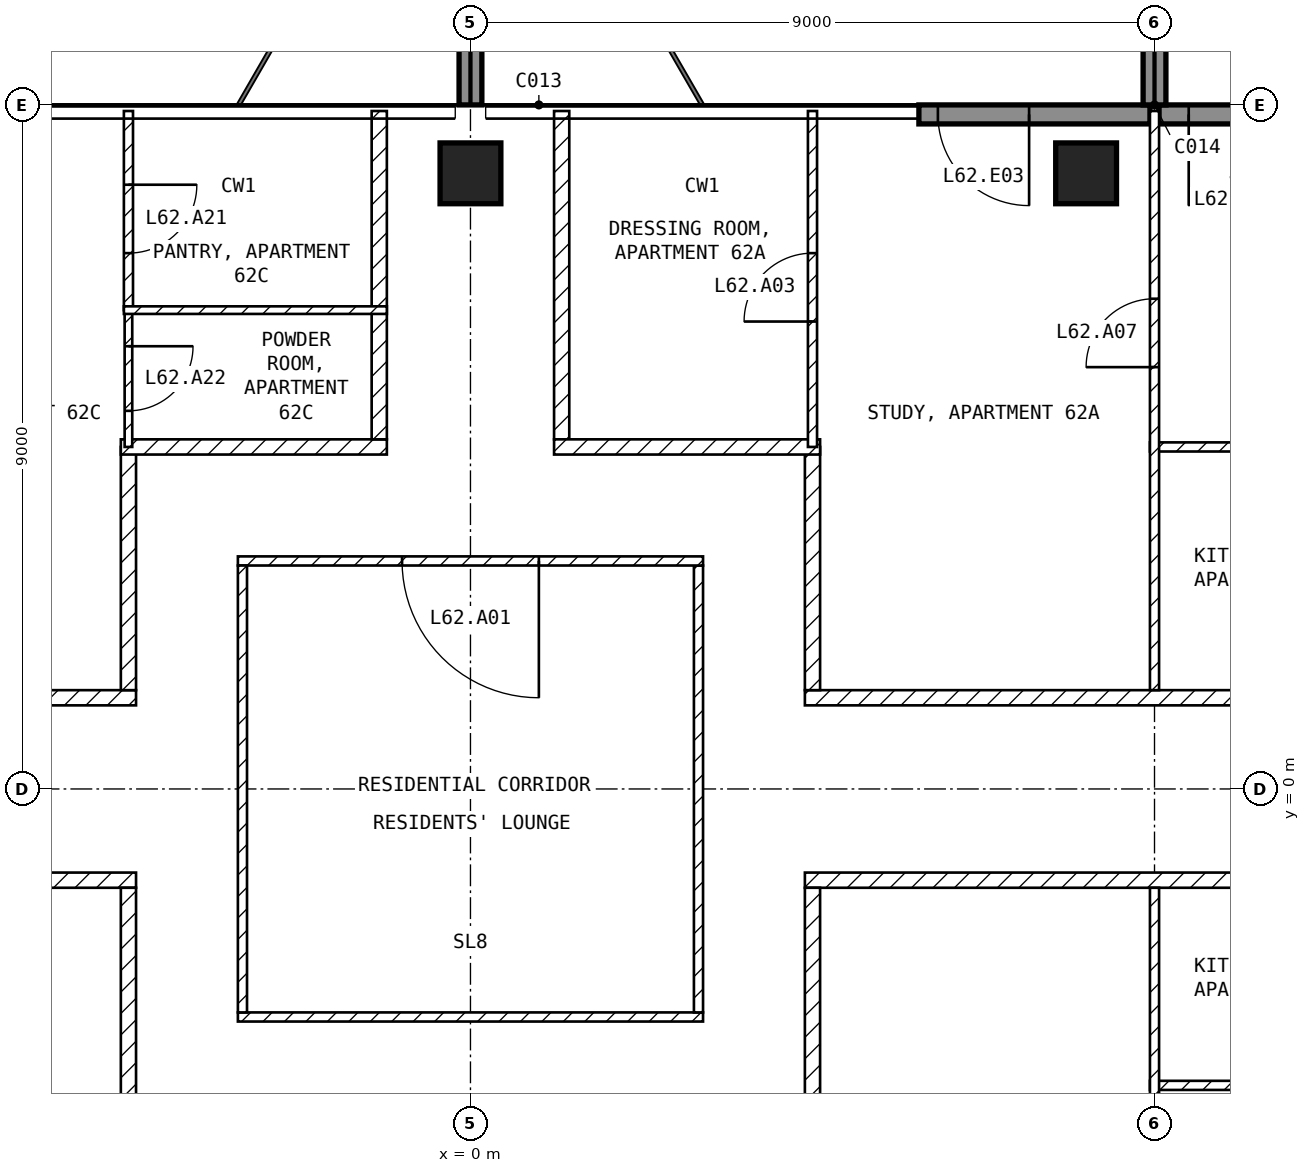
"""IFC4 building model, lengths in metres.
Left out: names, types, materials, properties, quantities, classifications, styles, units other than length and angle.
Written with IfcOpenShell. Run it as: python <this file> out.ifc"""

import sys

from ifc_helpers import new_model, si_unit, direction, frame, frame_2d, origin, origin_2d, place, context, subcontext, project, spatial, rectangle, extrude, element, fill, save


model = new_model("IFC4")
c1 = context("Model", 3, precision=1e-05, world=origin(), true_north=direction((0.0, 1.0)))
c2 = subcontext(c1, "Body", "Model", "MODEL_VIEW")
j1 = project(units=[si_unit("LENGTHUNIT", "METRE"), si_unit("PLANEANGLEUNIT", "RADIAN")], contexts=[c1])
p1 = place(None, origin())
s1 = spatial("IfcSite", under=j1, at=p1, CompositionType="ELEMENT")
p2 = place(p1, origin())
s2 = spatial("IfcBuilding", under=s1, at=p2, CompositionType="ELEMENT")
p3 = place(p2, frame((0.0, 0.0, 246.5)))
s3 = spatial("IfcBuildingStorey", under=s2, at=p3, CompositionType="ELEMENT", Elevation=246.5)
for number, where, z_axis, x_axis in (
    (1, (0.0, 8.1, -0.25), (0.0, 0.0, 1.0), (1.0, 0.0, 0.0)),
    (2, (8.1, 8.1, -0.25), (0.0, 0.0, 1.0), (1.0, 0.0, 0.0)),
):
    element("IfcColumn", number, at=place(p3, frame(where, z_axis=z_axis, x_axis=x_axis)), inside=s3, PredefinedType="COLUMN", context=c2, shape_type="SweptSolid", body=[
        extrude(rectangle(XDim=0.8, YDim=0.8, at=origin_2d()), origin(), (0.0, 0.0, 1.0), 3.5),
    ])
p4 = place(p3, frame((10.9, 8.875, 0.0), z_axis=(0.0, 0.0, 1.0), x_axis=(-1.0, 0.0, 0.0)))
e3 = element("IfcWall", 3, at=p4, inside=s3, PredefinedType="SOLIDWALL", context=c2, shape_type="SweptSolid", body=[
    extrude(rectangle(XDim=1.84, YDim=0.25, at=frame_2d((0.92, 0.0))), origin(), (0.0, 0.0, 1.0), 3.25),
])
p5 = place(p4, frame((0.25, 0.0, 0.0)))
e4 = element("IfcOpeningElement", 4, at=p5, cuts=e3, PredefinedType="OPENING", context=c2, shape_type="SweptSolid", body=[
    extrude(rectangle(XDim=1.2, YDim=2.4, at=frame_2d((0.6, 1.2))), frame((0.0, 0.135, 0.0), z_axis=(0.0, -1.0, 0.0), x_axis=(1.0, 0.0, 0.0)), (0.0, 0.0, 1.0), 0.27),
])
p6 = place(p3, frame((8.94, 8.875, 0.0), z_axis=(0.0, 0.0, 1.0), x_axis=(-1.0, 0.0, 0.0)))
e5 = element("IfcWall", 5, at=p6, inside=s3, PredefinedType="SOLIDWALL", context=c2, shape_type="SweptSolid", body=[
    extrude(rectangle(XDim=3.04, YDim=0.25, at=frame_2d((1.52, 0.0))), origin(), (0.0, 0.0, 1.0), 3.25),
])
p7 = place(p6, frame((1.59, 0.0, 0.0)))
e6 = element("IfcOpeningElement", 6, at=p7, cuts=e5, PredefinedType="OPENING", context=c2, shape_type="SweptSolid", body=[
    extrude(rectangle(XDim=1.2, YDim=2.4, at=frame_2d((0.6, 1.2))), frame((0.0, 0.135, 0.0), z_axis=(0.0, -1.0, 0.0), x_axis=(1.0, 0.0, 0.0)), (0.0, 0.0, 1.0), 0.27),
])
for number, where, z_axis, x_axis in (
    (7, (0.0, 9.0, 0.0), (0.0, 0.0, 1.0), (0.0, 1.0, 0.0)),
    (8, (9.0, 9.0, 0.0), (0.0, 0.0, 1.0), (0.0, 1.0, 0.0)),
):
    element("IfcWall", number, at=place(p3, frame(where, z_axis=z_axis, x_axis=x_axis)), inside=s3, PredefinedType="SOLIDWALL", context=c2, shape_type="SweptSolid", body=[
        extrude(rectangle(XDim=2.7, YDim=0.3, at=frame_2d((1.35, 0.0))), origin(), (0.0, 0.0, 1.0), 3.25),
    ])
p8 = place(p3, frame((-3.06, -3.0, 0.0), z_axis=(0.0, 0.0, 1.0), x_axis=(1.0, 0.0, 0.0)))
e9 = element("IfcWall", 9, at=p8, inside=s3, PredefinedType="PARTITIONING", context=c2, shape_type="SweptSolid", body=[
    extrude(rectangle(XDim=6.12, YDim=0.12, at=frame_2d((3.06, 0.0))), origin(), (0.0, 0.0, 1.0), 3.25),
])
p9 = place(p3, frame((3.0, -2.94, 0.0), z_axis=(0.0, 0.0, 1.0), x_axis=(0.0, 1.0, 0.0)))
e10 = element("IfcWall", 10, at=p9, inside=s3, PredefinedType="PARTITIONING", context=c2, shape_type="SweptSolid", body=[
    extrude(rectangle(XDim=5.88, YDim=0.12, at=frame_2d((2.94, 0.0))), origin(), (0.0, 0.0, 1.0), 3.25),
])
p10 = place(p3, frame((3.06, 3.0, 0.0), z_axis=(0.0, 0.0, 1.0), x_axis=(-1.0, 0.0, 0.0)))
e11 = element("IfcWall", 11, at=p10, inside=s3, PredefinedType="PARTITIONING", context=c2, shape_type="SweptSolid", body=[
    extrude(rectangle(XDim=6.12, YDim=0.12, at=frame_2d((3.06, 0.0))), origin(), (0.0, 0.0, 1.0), 3.25),
])
p11 = place(p10, frame((2.16, 0.0, 0.0)))
e12 = element("IfcOpeningElement", 12, at=p11, cuts=e11, PredefinedType="OPENING", context=c2, shape_type="SweptSolid", body=[
    extrude(rectangle(XDim=1.8, YDim=2.1, at=frame_2d((0.9, 1.05))), frame((0.0, 0.07, 0.0), z_axis=(0.0, -1.0, 0.0), x_axis=(1.0, 0.0, 0.0)), (0.0, 0.0, 1.0), 0.14),
])
p12 = place(p3, frame((-3.0, 2.94, 0.0), z_axis=(0.0, 0.0, 1.0), x_axis=(0.0, -1.0, 0.0)))
e13 = element("IfcWall", 13, at=p12, inside=s3, PredefinedType="PARTITIONING", context=c2, shape_type="SweptSolid", body=[
    extrude(rectangle(XDim=5.88, YDim=0.12, at=frame_2d((2.94, 0.0))), origin(), (0.0, 0.0, 1.0), 3.25),
])
p13 = place(p3, frame((4.4, 1.2, 0.0), z_axis=(0.0, 0.0, 1.0), x_axis=(1.0, 0.0, 0.0)))
e14 = element("IfcWall", 14, at=p13, inside=s3, PredefinedType="PARTITIONING", context=c2, shape_type="SweptSolid", body=[
    extrude(rectangle(XDim=17.2, YDim=0.2, at=frame_2d((8.6, 0.0))), origin(), (0.0, 0.0, 1.0), 3.25),
])
p14 = place(p13, frame((8.3, 0.0, 0.0)))
e15 = element("IfcOpeningElement", 15, at=p14, cuts=e14, PredefinedType="OPENING", context=c2, shape_type="SweptSolid", body=[
    extrude(rectangle(XDim=1.0, YDim=2.1, at=frame_2d((0.5, 1.05))), frame((0.0, 0.11, 0.0), z_axis=(0.0, -1.0, 0.0), x_axis=(1.0, 0.0, 0.0)), (0.0, 0.0, 1.0), 0.22),
])
p15 = place(p3, frame((4.5, 4.5, 0.0), z_axis=(0.0, 0.0, 1.0), x_axis=(0.0, -1.0, 0.0)))
e16 = element("IfcWall", 16, at=p15, inside=s3, PredefinedType="PARTITIONING", context=c2, shape_type="SweptSolid", body=[
    extrude(rectangle(XDim=3.2, YDim=0.2, at=frame_2d((1.6, 0.0))), origin(), (0.0, 0.0, 1.0), 3.25),
])
p16 = place(p3, frame((1.2, 8.92, 0.0), z_axis=(0.0, 0.0, 1.0), x_axis=(0.0, -1.0, 0.0)))
e17 = element("IfcWall", 17, at=p16, inside=s3, PredefinedType="PARTITIONING", context=c2, shape_type="SweptSolid", body=[
    extrude(rectangle(XDim=4.32, YDim=0.2, at=frame_2d((2.16, 0.0))), origin(), (0.0, 0.0, 1.0), 3.25),
])
p17 = place(p3, frame((1.1, 4.5, 0.0), z_axis=(0.0, 0.0, 1.0), x_axis=(1.0, 0.0, 0.0)))
e18 = element("IfcWall", 18, at=p17, inside=s3, PredefinedType="PARTITIONING", context=c2, shape_type="SweptSolid", body=[
    extrude(rectangle(XDim=3.5, YDim=0.2, at=frame_2d((1.75, 0.0))), origin(), (0.0, 0.0, 1.0), 3.25),
])
p18 = place(p3, frame((21.6, -1.2, 0.0), z_axis=(0.0, 0.0, 1.0), x_axis=(-1.0, 0.0, 0.0)))
e19 = element("IfcWall", 19, at=p18, inside=s3, PredefinedType="PARTITIONING", context=c2, shape_type="SweptSolid", body=[
    extrude(rectangle(XDim=17.2, YDim=0.2, at=frame_2d((8.6, 0.0))), origin(), (0.0, 0.0, 1.0), 3.25),
])
p19 = place(p18, frame((7.9, 0.0, 0.0)))
e20 = element("IfcOpeningElement", 20, at=p19, cuts=e19, PredefinedType="OPENING", context=c2, shape_type="SweptSolid", body=[
    extrude(rectangle(XDim=1.0, YDim=2.1, at=frame_2d((0.5, 1.05))), frame((0.0, 0.11, 0.0), z_axis=(0.0, -1.0, 0.0), x_axis=(1.0, 0.0, 0.0)), (0.0, 0.0, 1.0), 0.22),
])
p20 = place(p3, frame((4.5, -1.3, 0.0), z_axis=(0.0, 0.0, 1.0), x_axis=(0.0, -1.0, 0.0)))
e21 = element("IfcWall", 21, at=p20, inside=s3, PredefinedType="PARTITIONING", context=c2, shape_type="SweptSolid", body=[
    extrude(rectangle(XDim=3.2, YDim=0.2, at=frame_2d((1.6, 0.0))), origin(), (0.0, 0.0, 1.0), 3.25),
])
p21 = place(p3, frame((-21.6, 1.2, 0.0), z_axis=(0.0, 0.0, 1.0), x_axis=(1.0, 0.0, 0.0)))
e22 = element("IfcWall", 22, at=p21, inside=s3, PredefinedType="PARTITIONING", context=c2, shape_type="SweptSolid", body=[
    extrude(rectangle(XDim=17.2, YDim=0.2, at=frame_2d((8.6, 0.0))), origin(), (0.0, 0.0, 1.0), 3.25),
])
p22 = place(p21, frame((10.3, 0.0, 0.0)))
e23 = element("IfcOpeningElement", 23, at=p22, cuts=e22, PredefinedType="OPENING", context=c2, shape_type="SweptSolid", body=[
    extrude(rectangle(XDim=1.0, YDim=2.1, at=frame_2d((0.5, 1.05))), frame((0.0, 0.11, 0.0), z_axis=(0.0, -1.0, 0.0), x_axis=(1.0, 0.0, 0.0)), (0.0, 0.0, 1.0), 0.22),
])
p23 = place(p3, frame((-4.5, 1.3, 0.0), z_axis=(0.0, 0.0, 1.0), x_axis=(0.0, 1.0, 0.0)))
e24 = element("IfcWall", 24, at=p23, inside=s3, PredefinedType="PARTITIONING", context=c2, shape_type="SweptSolid", body=[
    extrude(rectangle(XDim=3.2, YDim=0.2, at=frame_2d((1.6, 0.0))), origin(), (0.0, 0.0, 1.0), 3.25),
])
p24 = place(p3, frame((-4.6, 4.5, 0.0), z_axis=(0.0, 0.0, 1.0), x_axis=(1.0, 0.0, 0.0)))
e25 = element("IfcWall", 25, at=p24, inside=s3, PredefinedType="PARTITIONING", context=c2, shape_type="SweptSolid", body=[
    extrude(rectangle(XDim=3.5, YDim=0.2, at=frame_2d((1.75, 0.0))), origin(), (0.0, 0.0, 1.0), 3.25),
])
p25 = place(p3, frame((-1.2, 4.6, 0.0), z_axis=(0.0, 0.0, 1.0), x_axis=(0.0, 1.0, 0.0)))
e26 = element("IfcWall", 26, at=p25, inside=s3, PredefinedType="PARTITIONING", context=c2, shape_type="SweptSolid", body=[
    extrude(rectangle(XDim=4.32, YDim=0.2, at=frame_2d((2.16, 0.0))), origin(), (0.0, 0.0, 1.0), 3.25),
])
p26 = place(p3, frame((-4.4, -1.2, 0.0), z_axis=(0.0, 0.0, 1.0), x_axis=(-1.0, 0.0, 0.0)))
e27 = element("IfcWall", 27, at=p26, inside=s3, PredefinedType="PARTITIONING", context=c2, shape_type="SweptSolid", body=[
    extrude(rectangle(XDim=17.2, YDim=0.2, at=frame_2d((8.6, 0.0))), origin(), (0.0, 0.0, 1.0), 3.25),
])
p27 = place(p26, frame((5.375, 0.0, 0.0)))
e28 = element("IfcOpeningElement", 28, at=p27, cuts=e27, PredefinedType="OPENING", context=c2, shape_type="SweptSolid", body=[
    extrude(rectangle(XDim=1.0, YDim=2.1, at=frame_2d((0.5, 1.05))), frame((0.0, 0.11, 0.0), z_axis=(0.0, -1.0, 0.0), x_axis=(1.0, 0.0, 0.0)), (0.0, 0.0, 1.0), 0.22),
])
p28 = place(p3, frame((-4.5, -4.5, 0.0), z_axis=(0.0, 0.0, 1.0), x_axis=(0.0, 1.0, 0.0)))
e29 = element("IfcWall", 29, at=p28, inside=s3, PredefinedType="PARTITIONING", context=c2, shape_type="SweptSolid", body=[
    extrude(rectangle(XDim=3.2, YDim=0.2, at=frame_2d((1.6, 0.0))), origin(), (0.0, 0.0, 1.0), 3.25),
])
p29 = place(p3, frame((8.94, 4.5, 0.0), z_axis=(0.0, 0.0, 1.0), x_axis=(1.0, 0.0, 0.0)))
e30 = element("IfcWall", 30, at=p29, inside=s3, PredefinedType="PARTITIONING", context=c2, shape_type="SweptSolid", body=[
    extrude(rectangle(XDim=7.86, YDim=0.12, at=frame_2d((3.93, 0.0))), origin(), (0.0, 0.0, 1.0), 3.25),
])
p30 = place(p29, frame((3.81, 0.0, 0.0)))
e31 = element("IfcOpeningElement", 31, at=p30, cuts=e30, PredefinedType="OPENING", context=c2, shape_type="SweptSolid", body=[
    extrude(rectangle(XDim=0.9, YDim=2.1, at=frame_2d((0.45, 1.05))), frame((0.0, 0.07, 0.0), z_axis=(0.0, -1.0, 0.0), x_axis=(1.0, 0.0, 0.0)), (0.0, 0.0, 1.0), 0.14),
])
p31 = place(p3, frame((9.0, 1.3, 0.0), z_axis=(0.0, 0.0, 1.0), x_axis=(0.0, 1.0, 0.0)))
e32 = element("IfcWall", 32, at=p31, inside=s3, PredefinedType="PARTITIONING", context=c2, shape_type="SweptSolid", body=[
    extrude(rectangle(XDim=7.62, YDim=0.12, at=frame_2d((3.81, 0.0))), origin(), (0.0, 0.0, 1.0), 3.25),
])
p32 = place(p31, frame((4.25, 0.0, 0.0)))
e33 = element("IfcOpeningElement", 33, at=p32, cuts=e32, PredefinedType="OPENING", context=c2, shape_type="SweptSolid", body=[
    extrude(rectangle(XDim=0.9, YDim=2.1, at=frame_2d((0.45, 1.05))), frame((0.0, 0.07, 0.0), z_axis=(0.0, -1.0, 0.0), x_axis=(1.0, 0.0, 0.0)), (0.0, 0.0, 1.0), 0.14),
])
p33 = place(p3, frame((4.5, 4.5, 0.0), z_axis=(0.0, 0.0, 1.0), x_axis=(0.0, 1.0, 0.0)))
e34 = element("IfcWall", 34, at=p33, inside=s3, PredefinedType="PARTITIONING", context=c2, shape_type="SweptSolid", body=[
    extrude(rectangle(XDim=4.42, YDim=0.12, at=frame_2d((2.21, 0.0))), origin(), (0.0, 0.0, 1.0), 3.25),
])
p34 = place(p33, frame((1.65, 0.0, 0.0)))
e35 = element("IfcOpeningElement", 35, at=p34, cuts=e34, PredefinedType="OPENING", context=c2, shape_type="SweptSolid", body=[
    extrude(rectangle(XDim=0.9, YDim=2.1, at=frame_2d((0.45, 1.05))), frame((0.0, 0.07, 0.0), z_axis=(0.0, -1.0, 0.0), x_axis=(1.0, 0.0, 0.0)), (0.0, 0.0, 1.0), 0.14),
])
p35 = place(p3, frame((16.8, -3.9, 0.0), z_axis=(0.0, 0.0, 1.0), x_axis=(-1.0, 0.0, 0.0)))
e36 = element("IfcWall", 36, at=p35, inside=s3, PredefinedType="PARTITIONING", context=c2, shape_type="SweptSolid", body=[
    extrude(rectangle(XDim=7.86, YDim=0.12, at=frame_2d((3.93, 0.0))), origin(), (0.0, 0.0, 1.0), 3.25),
])
p36 = place(p35, frame((3.15, 0.0, 0.0)))
e37 = element("IfcOpeningElement", 37, at=p36, cuts=e36, PredefinedType="OPENING", context=c2, shape_type="SweptSolid", body=[
    extrude(rectangle(XDim=0.9, YDim=2.1, at=frame_2d((0.45, 1.05))), frame((0.0, 0.07, 0.0), z_axis=(0.0, -1.0, 0.0), x_axis=(1.0, 0.0, 0.0)), (0.0, 0.0, 1.0), 0.14),
])
p37 = place(p3, frame((9.0, -8.92, 0.0), z_axis=(0.0, 0.0, 1.0), x_axis=(0.0, 1.0, 0.0)))
e38 = element("IfcWall", 38, at=p37, inside=s3, PredefinedType="PARTITIONING", context=c2, shape_type="SweptSolid", body=[
    extrude(rectangle(XDim=7.62, YDim=0.12, at=frame_2d((3.81, 0.0))), origin(), (0.0, 0.0, 1.0), 3.25),
])
p38 = place(p37, frame((2.32, 0.0, 0.0)))
e39 = element("IfcOpeningElement", 39, at=p38, cuts=e38, PredefinedType="OPENING", context=c2, shape_type="SweptSolid", body=[
    extrude(rectangle(XDim=0.9, YDim=2.1, at=frame_2d((0.45, 1.05))), frame((0.0, 0.07, 0.0), z_axis=(0.0, -1.0, 0.0), x_axis=(1.0, 0.0, 0.0)), (0.0, 0.0, 1.0), 0.14),
])
p39 = place(p3, frame((-4.5, 6.3, 0.0), z_axis=(0.0, 0.0, 1.0), x_axis=(0.0, -1.0, 0.0)))
e40 = element("IfcWall", 40, at=p39, inside=s3, PredefinedType="PARTITIONING", context=c2, shape_type="SweptSolid", body=[
    extrude(rectangle(XDim=1.8, YDim=0.1, at=frame_2d((0.9, 0.0))), origin(), (0.0, 0.0, 1.0), 3.25),
])
p40 = place(p39, frame((0.475, 0.0, 0.0)))
e41 = element("IfcOpeningElement", 41, at=p40, cuts=e40, PredefinedType="OPENING", context=c2, shape_type="SweptSolid", body=[
    extrude(rectangle(XDim=0.85, YDim=2.1, at=frame_2d((0.425, 1.05))), frame((0.0, 0.06, 0.0), z_axis=(0.0, -1.0, 0.0), x_axis=(1.0, 0.0, 0.0)), (0.0, 0.0, 1.0), 0.12),
])
p41 = place(p3, frame((-4.5, 8.92, 0.0), z_axis=(0.0, 0.0, 1.0), x_axis=(0.0, -1.0, 0.0)))
e42 = element("IfcWall", 42, at=p41, inside=s3, PredefinedType="PARTITIONING", context=c2, shape_type="SweptSolid", body=[
    extrude(rectangle(XDim=2.62, YDim=0.12, at=frame_2d((1.31, 0.0))), origin(), (0.0, 0.0, 1.0), 3.25),
])
p42 = place(p41, frame((0.97, 0.0, 0.0)))
e43 = element("IfcOpeningElement", 43, at=p42, cuts=e42, PredefinedType="OPENING", context=c2, shape_type="SweptSolid", body=[
    extrude(rectangle(XDim=0.9, YDim=2.1, at=frame_2d((0.45, 1.05))), frame((0.0, 0.07, 0.0), z_axis=(0.0, -1.0, 0.0), x_axis=(1.0, 0.0, 0.0)), (0.0, 0.0, 1.0), 0.14),
])
p43 = place(p3, frame((-4.56, 6.3, 0.0), z_axis=(0.0, 0.0, 1.0), x_axis=(1.0, 0.0, 0.0)))
e44 = element("IfcWall", 44, at=p43, inside=s3, PredefinedType="PARTITIONING", context=c2, shape_type="SweptSolid", body=[
    extrude(rectangle(XDim=3.46, YDim=0.1, at=frame_2d((1.73, 0.0))), origin(), (0.0, 0.0, 1.0), 3.25),
])
p44 = place(p5, origin())
e45 = element("IfcDoor", 45, at=p44, inside=s3, OperationType="SINGLE_SWING_RIGHT", PredefinedType="DOOR", context=c2, shape_type="SweptSolid", body=[
    extrude(rectangle(XDim=1.2, YDim=2.4, at=frame_2d((0.6, 1.2))), frame((0.0, 0.025, 0.0), z_axis=(0.0, -1.0, 0.0), x_axis=(1.0, 0.0, 0.0)), (0.0, 0.0, 1.0), 0.05),
])
fill(e4, e45)
p45 = place(p7, origin())
e46 = element("IfcDoor", 46, at=p45, inside=s3, OperationType="SINGLE_SWING_LEFT", PredefinedType="DOOR", context=c2, shape_type="SweptSolid", body=[
    extrude(rectangle(XDim=1.2, YDim=2.4, at=frame_2d((0.6, 1.2))), frame((0.0, 0.025, 0.0), z_axis=(0.0, -1.0, 0.0), x_axis=(1.0, 0.0, 0.0)), (0.0, 0.0, 1.0), 0.05),
])
fill(e6, e46)
p46 = place(p11, origin())
e47 = element("IfcDoor", 47, at=p46, inside=s3, OperationType="SINGLE_SWING_LEFT", PredefinedType="DOOR", context=c2, shape_type="SweptSolid", body=[
    extrude(rectangle(XDim=1.8, YDim=2.1, at=frame_2d((0.9, 1.05))), frame((0.0, 0.025, 0.0), z_axis=(0.0, -1.0, 0.0), x_axis=(1.0, 0.0, 0.0)), (0.0, 0.0, 1.0), 0.05),
])
fill(e12, e47)
p47 = place(p34, origin())
e48 = element("IfcDoor", 48, at=p47, inside=s3, OperationType="SINGLE_SWING_LEFT", PredefinedType="DOOR", context=c2, shape_type="SweptSolid", body=[
    extrude(rectangle(XDim=0.9, YDim=2.1, at=frame_2d((0.45, 1.05))), frame((0.0, 0.025, 0.0), z_axis=(0.0, -1.0, 0.0), x_axis=(1.0, 0.0, 0.0)), (0.0, 0.0, 1.0), 0.05),
])
fill(e35, e48)
p48 = place(p32, origin())
e49 = element("IfcDoor", 49, at=p48, inside=s3, OperationType="SINGLE_SWING_LEFT", PredefinedType="DOOR", context=c2, shape_type="SweptSolid", body=[
    extrude(rectangle(XDim=0.9, YDim=2.1, at=frame_2d((0.45, 1.05))), frame((0.0, 0.025, 0.0), z_axis=(0.0, -1.0, 0.0), x_axis=(1.0, 0.0, 0.0)), (0.0, 0.0, 1.0), 0.05),
])
fill(e33, e49)
p49 = place(p42, origin())
e50 = element("IfcDoor", 50, at=p49, inside=s3, OperationType="SINGLE_SWING_LEFT", PredefinedType="DOOR", context=c2, shape_type="SweptSolid", body=[
    extrude(rectangle(XDim=0.9, YDim=2.1, at=frame_2d((0.45, 1.05))), frame((0.0, 0.025, 0.0), z_axis=(0.0, -1.0, 0.0), x_axis=(1.0, 0.0, 0.0)), (0.0, 0.0, 1.0), 0.05),
])
fill(e43, e50)
p50 = place(p40, origin())
e51 = element("IfcDoor", 51, at=p50, inside=s3, OperationType="SINGLE_SWING_LEFT", PredefinedType="DOOR", context=c2, shape_type="SweptSolid", body=[
    extrude(rectangle(XDim=0.85, YDim=2.1, at=frame_2d((0.425, 1.05))), frame((0.0, 0.025, 0.0), z_axis=(0.0, -1.0, 0.0), x_axis=(1.0, 0.0, 0.0)), (0.0, 0.0, 1.0), 0.05),
])
fill(e41, e51)
save(model, sys.argv[1])
